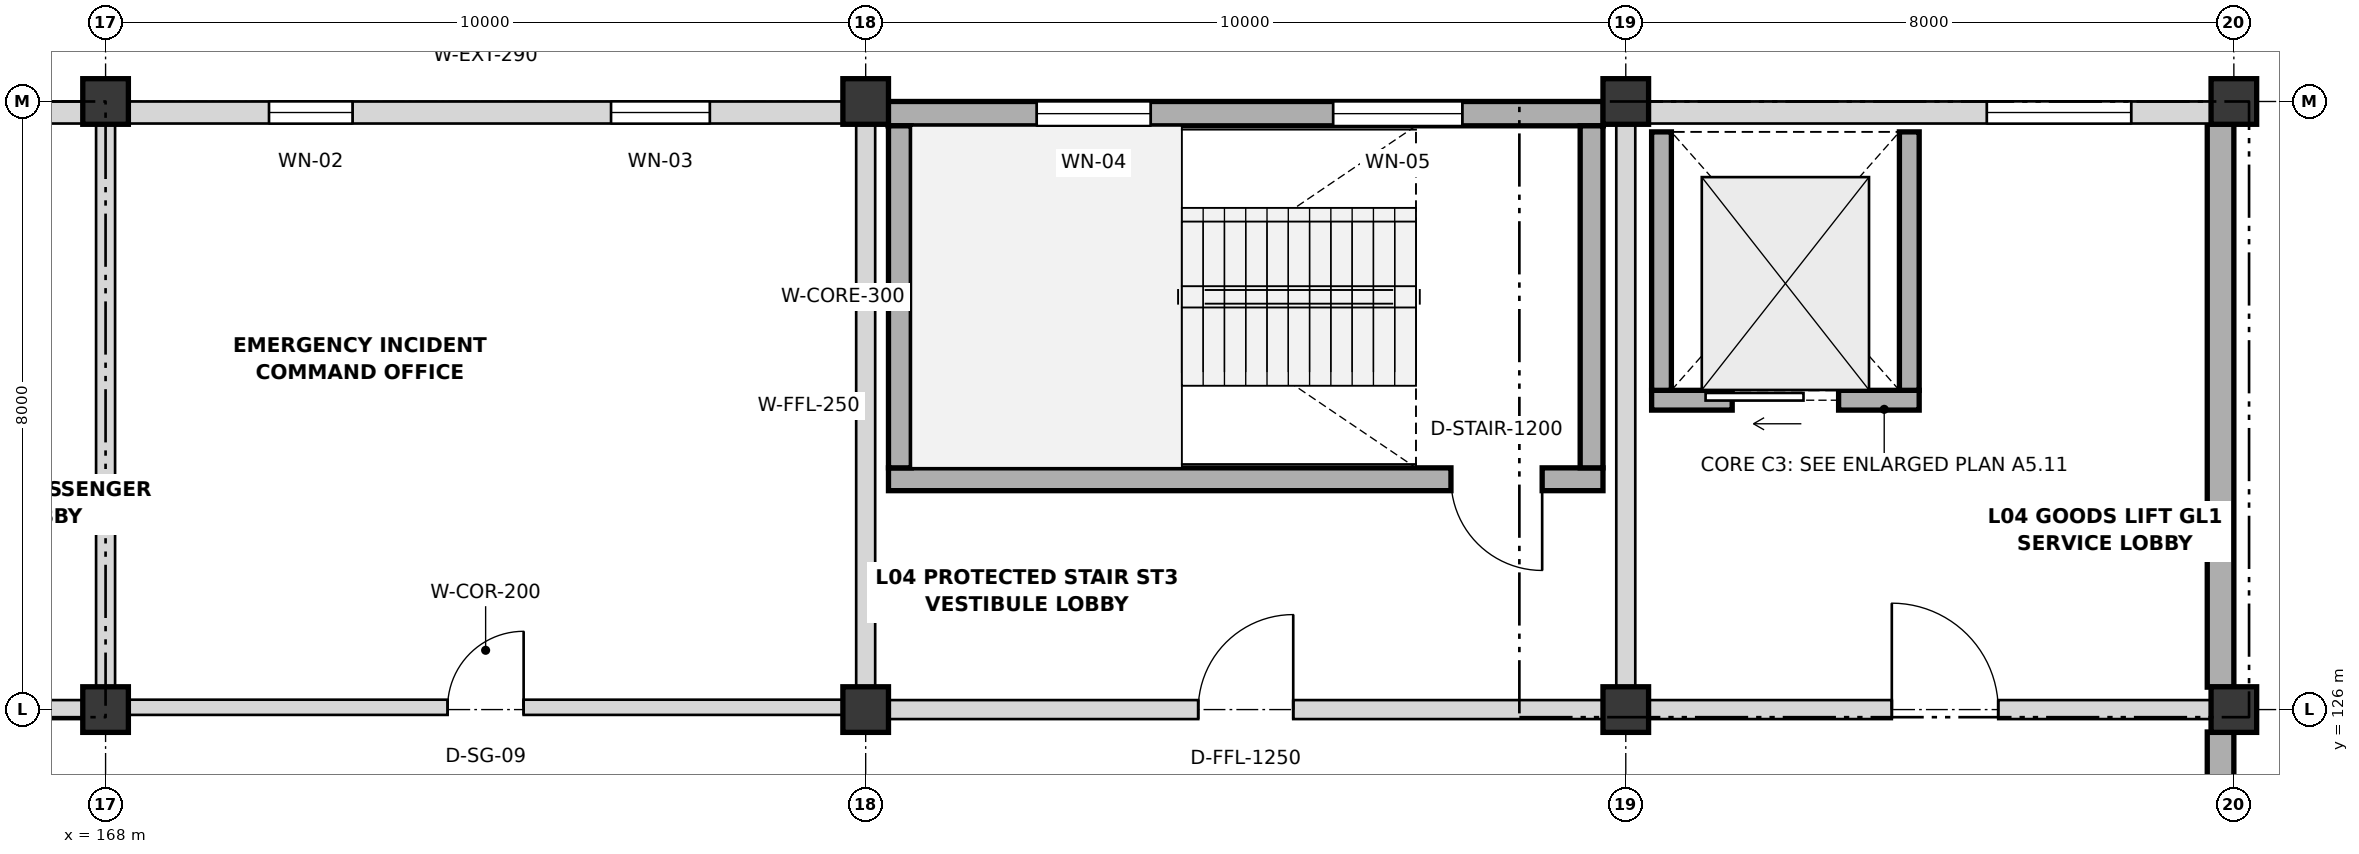
"""IFC4 building model, lengths in metres.
Left out: names, types, materials, properties, quantities, classifications, styles, units other than length and angle.
Written with IfcOpenShell. Run it as: python <this file> out.ifc"""

import sys

from ifc_helpers import new_model, si_unit, direction, frame, frame_2d, origin, origin_2d, place, context, subcontext, project, spatial, rectangle, extrude, element, fill, save


model = new_model("IFC4")
c1 = context("Model", 3, precision=1e-05, world=origin(), true_north=direction((0.0, 1.0)))
c2 = subcontext(c1, "Body", "Model", "MODEL_VIEW")
j1 = project(units=[si_unit("LENGTHUNIT", "METRE"), si_unit("PLANEANGLEUNIT", "RADIAN")], contexts=[c1])
p1 = place(None, origin())
s1 = spatial("IfcSite", under=j1, at=p1, CompositionType="ELEMENT")
p2 = place(p1, origin())
s2 = spatial("IfcBuilding", under=s1, at=p2, CompositionType="ELEMENT")
p3 = place(p2, frame((0.0, 0.0, 18.6)))
s3 = spatial("IfcBuildingStorey", under=s2, at=p3, CompositionType="ELEMENT", Elevation=18.6)
for number, where, z_axis, x_axis in (
    (1, (168.0, 126.0, 0.0), (0.0, 0.0, 1.0), (1.0, 0.0, 0.0)),
    (2, (168.0, 134.0, 0.0), (0.0, 0.0, 1.0), (1.0, 0.0, 0.0)),
    (3, (178.0, 126.0, 0.0), (0.0, 0.0, 1.0), (1.0, 0.0, 0.0)),
    (4, (178.0, 134.0, 0.0), (0.0, 0.0, 1.0), (1.0, 0.0, 0.0)),
    (5, (188.0, 126.0, 0.0), (0.0, 0.0, 1.0), (1.0, 0.0, 0.0)),
    (6, (188.0, 134.0, 0.0), (0.0, 0.0, 1.0), (1.0, 0.0, 0.0)),
    (7, (196.0, 126.0, 0.0), (0.0, 0.0, 1.0), (1.0, 0.0, 0.0)),
    (8, (196.0, 134.0, 0.0), (0.0, 0.0, 1.0), (1.0, 0.0, 0.0)),
):
    element("IfcColumn", number, at=place(p3, frame(where, z_axis=z_axis, x_axis=x_axis)), inside=s3, PredefinedType="COLUMN", context=c2, shape_type="SweptSolid", body=[
        extrude(rectangle(XDim=0.6, YDim=0.6, at=origin_2d()), origin(), (0.0, 0.0, 1.0), 4.2),
    ])
p4 = place(p3, frame((195.825, 125.705, 0.0), z_axis=(0.0, 0.0, 1.0), x_axis=(0.0, -1.0, 0.0)))
e9 = element("IfcWall", 9, at=p4, inside=s3, PredefinedType="SOLIDWALL", context=c2, shape_type="SweptSolid", body=[
    extrude(rectangle(XDim=11.41, YDim=0.35, at=frame_2d((5.705, 0.0))), origin(), (0.0, 0.0, 1.0), 4.2),
])
p5 = place(p3, frame((195.825, 133.705, 0.0), z_axis=(0.0, 0.0, 1.0), x_axis=(0.0, -1.0, 0.0)))
e10 = element("IfcWall", 10, at=p5, inside=s3, PredefinedType="SOLIDWALL", context=c2, shape_type="SweptSolid", body=[
    extrude(rectangle(XDim=7.41, YDim=0.35, at=frame_2d((3.705, 0.0))), origin(), (0.0, 0.0, 1.0), 4.2),
])
p6 = place(p3, frame((158.295, 133.855, 0.0), z_axis=(0.0, 0.0, 1.0), x_axis=(1.0, 0.0, 0.0)))
e11 = element("IfcWall", 11, at=p6, inside=s3, PredefinedType="SOLIDWALL", context=c2, shape_type="SweptSolid", body=[
    extrude(rectangle(XDim=9.41, YDim=0.29, at=frame_2d((4.705, 0.0))), origin(), (0.0, 0.0, 1.0), 3.188),
])
p7 = place(p6, frame((3.455, 0.0, 1.05)))
e12 = element("IfcOpeningElement", 12, at=p7, cuts=e11, PredefinedType="OPENING", context=c2, shape_type="SweptSolid", body=[
    extrude(rectangle(XDim=0.9, YDim=1.15, at=frame_2d((0.45, 0.575))), frame((0.0, 0.155, 0.0), z_axis=(0.0, -1.0, 0.0), x_axis=(1.0, 0.0, 0.0)), (0.0, 0.0, 1.0), 0.31),
])
p8 = place(p3, frame((168.295, 133.855, 0.0), z_axis=(0.0, 0.0, 1.0), x_axis=(1.0, 0.0, 0.0)))
e13 = element("IfcWall", 13, at=p8, inside=s3, PredefinedType="SOLIDWALL", context=c2, shape_type="SweptSolid", body=[
    extrude(rectangle(XDim=9.41, YDim=0.29, at=frame_2d((4.705, 0.0))), origin(), (0.0, 0.0, 1.0), 3.188),
])
p9 = place(p8, frame((1.855, 0.0, 1.05)))
e14 = element("IfcOpeningElement", 14, at=p9, cuts=e13, PredefinedType="OPENING", context=c2, shape_type="SweptSolid", body=[
    extrude(rectangle(XDim=1.1, YDim=1.15, at=frame_2d((0.55, 0.575))), frame((0.0, 0.155, 0.0), z_axis=(0.0, -1.0, 0.0), x_axis=(1.0, 0.0, 0.0)), (0.0, 0.0, 1.0), 0.31),
])
p10 = place(p8, frame((6.355, 0.0, 1.05)))
e15 = element("IfcOpeningElement", 15, at=p10, cuts=e13, PredefinedType="OPENING", context=c2, shape_type="SweptSolid", body=[
    extrude(rectangle(XDim=1.3, YDim=1.15, at=frame_2d((0.65, 0.575))), frame((0.0, 0.155, 0.0), z_axis=(0.0, -1.0, 0.0), x_axis=(1.0, 0.0, 0.0)), (0.0, 0.0, 1.0), 0.31),
])
p11 = place(p3, frame((178.295, 133.84, 0.0), z_axis=(0.0, 0.0, 1.0), x_axis=(1.0, 0.0, 0.0)))
e16 = element("IfcWall", 16, at=p11, inside=s3, PredefinedType="SHEAR", context=c2, shape_type="SweptSolid", body=[
    extrude(rectangle(XDim=9.41, YDim=0.32, at=frame_2d((4.705, 0.0))), origin(), (0.0, 0.0, 1.0), 4.2),
])
p12 = place(p11, frame((1.955, 0.0, 1.05)))
e17 = element("IfcOpeningElement", 17, at=p12, cuts=e16, PredefinedType="OPENING", context=c2, shape_type="SweptSolid", body=[
    extrude(rectangle(XDim=1.5, YDim=1.15, at=frame_2d((0.75, 0.575))), frame((0.0, 0.17, 0.0), z_axis=(0.0, -1.0, 0.0), x_axis=(1.0, 0.0, 0.0)), (0.0, 0.0, 1.0), 0.34),
])
p13 = place(p11, frame((5.855, 0.0, 1.05)))
e18 = element("IfcOpeningElement", 18, at=p13, cuts=e16, PredefinedType="OPENING", context=c2, shape_type="SweptSolid", body=[
    extrude(rectangle(XDim=1.7, YDim=1.15, at=frame_2d((0.85, 0.575))), frame((0.0, 0.17, 0.0), z_axis=(0.0, -1.0, 0.0), x_axis=(1.0, 0.0, 0.0)), (0.0, 0.0, 1.0), 0.34),
])
p14 = place(p3, frame((188.295, 133.855, 0.0), z_axis=(0.0, 0.0, 1.0), x_axis=(1.0, 0.0, 0.0)))
e19 = element("IfcWall", 19, at=p14, inside=s3, PredefinedType="SOLIDWALL", context=c2, shape_type="SweptSolid", body=[
    extrude(rectangle(XDim=7.41, YDim=0.29, at=frame_2d((3.705, 0.0))), origin(), (0.0, 0.0, 1.0), 3.188),
])
p15 = place(p14, frame((4.455, 0.0, 1.05)))
e20 = element("IfcOpeningElement", 20, at=p15, cuts=e19, PredefinedType="OPENING", context=c2, shape_type="SweptSolid", body=[
    extrude(rectangle(XDim=1.9, YDim=1.15, at=frame_2d((0.95, 0.575))), frame((0.0, 0.155, 0.0), z_axis=(0.0, -1.0, 0.0), x_axis=(1.0, 0.0, 0.0)), (0.0, 0.0, 1.0), 0.31),
])
p16 = place(p3, frame((187.7, 129.03, 0.0), z_axis=(0.0, 0.0, 1.0), x_axis=(-1.0, 0.0, 0.0)))
e21 = element("IfcWall", 21, at=p16, inside=s3, PredefinedType="SHEAR", context=c2, shape_type="SweptSolid", body=[
    extrude(rectangle(XDim=9.4, YDim=0.3, at=frame_2d((4.7, 0.0))), origin(), (0.0, 0.0, 1.0), 4.2),
])
p17 = place(p16, frame((0.8, 0.0, 0.0)))
e22 = element("IfcOpeningElement", 22, at=p17, cuts=e21, PredefinedType="OPENING", context=c2, shape_type="SweptSolid", body=[
    extrude(rectangle(XDim=1.2, YDim=2.15, at=frame_2d((0.6, 1.075))), frame((0.0, 0.16, 0.0), z_axis=(0.0, -1.0, 0.0), x_axis=(1.0, 0.0, 0.0)), (0.0, 0.0, 1.0), 0.32),
])
for number, where, z_axis, x_axis in (
    (23, (187.55, 133.68, 0.0), (0.0, 0.0, 1.0), (0.0, -1.0, 0.0)),
    (24, (178.45, 129.18, 0.0), (0.0, 0.0, 1.0), (0.0, 1.0, 0.0)),
):
    element("IfcWall", number, at=place(p3, frame(where, z_axis=z_axis, x_axis=x_axis)), inside=s3, PredefinedType="SHEAR", context=c2, shape_type="SweptSolid", body=[
        extrude(rectangle(XDim=4.5, YDim=0.3, at=frame_2d((2.25, 0.0))), origin(), (0.0, 0.0, 1.0), 4.2),
    ])
p18 = place(p3, frame((188.34, 130.07, 0.0), z_axis=(0.0, 0.0, 1.0), x_axis=(1.0, 0.0, 0.0)))
e25 = element("IfcWall", 25, at=p18, inside=s3, PredefinedType="SHEAR", context=c2, shape_type="SweptSolid", body=[
    extrude(rectangle(XDim=3.52, YDim=0.26, at=frame_2d((1.76, 0.0))), origin(), (0.0, 0.0, 1.0), 4.2),
])
p19 = place(p18, frame((1.06, 0.0, 0.0)))
e26 = element("IfcOpeningElement", 26, at=p19, cuts=e25, PredefinedType="OPENING", context=c2, shape_type="SweptSolid", body=[
    extrude(rectangle(XDim=1.4, YDim=2.2, at=frame_2d((0.7, 1.1))), frame((0.0, 0.14, 0.0), z_axis=(0.0, -1.0, 0.0), x_axis=(1.0, 0.0, 0.0)), (0.0, 0.0, 1.0), 0.28),
])
for number, where, z_axis, x_axis in (
    (27, (188.47, 130.2, 0.0), (0.0, 0.0, 1.0), (0.0, 1.0, 0.0)),
    (28, (191.73, 130.2, 0.0), (0.0, 0.0, 1.0), (0.0, 1.0, 0.0)),
):
    element("IfcWall", number, at=place(p3, frame(where, z_axis=z_axis, x_axis=x_axis)), inside=s3, PredefinedType="SHEAR", context=c2, shape_type="SweptSolid", body=[
        extrude(rectangle(XDim=3.4, YDim=0.26, at=frame_2d((1.7, 0.0))), origin(), (0.0, 0.0, 1.0), 4.2),
    ])
p20 = place(p3, frame((158.305, 126.0, 0.0), z_axis=(0.0, 0.0, 1.0), x_axis=(1.0, 0.0, 0.0)))
e29 = element("IfcWall", 29, at=p20, inside=s3, PredefinedType="PARTITIONING", context=c2, shape_type="SweptSolid", body=[
    extrude(rectangle(XDim=9.39, YDim=0.25, at=frame_2d((4.695, 0.0))), origin(), (0.0, 0.0, 1.0), 3.188),
])
p21 = place(p20, frame((1.87, 0.0, 0.0)))
e30 = element("IfcOpeningElement", 30, at=p21, cuts=e29, PredefinedType="OPENING", context=c2, shape_type="SweptSolid", body=[
    extrude(rectangle(XDim=1.25, YDim=2.15, at=frame_2d((0.625, 1.075))), frame((0.0, 0.135, 0.0), z_axis=(0.0, -1.0, 0.0), x_axis=(1.0, 0.0, 0.0)), (0.0, 0.0, 1.0), 0.27),
])
p22 = place(p20, frame((6.345, 0.0, 0.0)))
e31 = element("IfcOpeningElement", 31, at=p22, cuts=e29, PredefinedType="OPENING", context=c2, shape_type="SweptSolid", body=[
    extrude(rectangle(XDim=1.1, YDim=2.15, at=frame_2d((0.55, 1.075))), frame((0.0, 0.135, 0.0), z_axis=(0.0, -1.0, 0.0), x_axis=(1.0, 0.0, 0.0)), (0.0, 0.0, 1.0), 0.27),
])
p23 = place(p3, frame((178.305, 126.0, 0.0), z_axis=(0.0, 0.0, 1.0), x_axis=(1.0, 0.0, 0.0)))
e32 = element("IfcWall", 32, at=p23, inside=s3, PredefinedType="PARTITIONING", context=c2, shape_type="SweptSolid", body=[
    extrude(rectangle(XDim=9.39, YDim=0.25, at=frame_2d((4.695, 0.0))), origin(), (0.0, 0.0, 1.0), 3.188),
])
p24 = place(p23, frame((4.07, 0.0, 0.0)))
e33 = element("IfcOpeningElement", 33, at=p24, cuts=e32, PredefinedType="OPENING", context=c2, shape_type="SweptSolid", body=[
    extrude(rectangle(XDim=1.25, YDim=2.15, at=frame_2d((0.625, 1.075))), frame((0.0, 0.135, 0.0), z_axis=(0.0, -1.0, 0.0), x_axis=(1.0, 0.0, 0.0)), (0.0, 0.0, 1.0), 0.27),
])
p25 = place(p3, frame((188.305, 126.0, 0.0), z_axis=(0.0, 0.0, 1.0), x_axis=(1.0, 0.0, 0.0)))
e34 = element("IfcWall", 34, at=p25, inside=s3, PredefinedType="PARTITIONING", context=c2, shape_type="SweptSolid", body=[
    extrude(rectangle(XDim=7.39, YDim=0.25, at=frame_2d((3.695, 0.0))), origin(), (0.0, 0.0, 1.0), 3.188),
])
p26 = place(p25, frame((3.195, 0.0, 0.0)))
e35 = element("IfcOpeningElement", 35, at=p26, cuts=e34, PredefinedType="OPENING", context=c2, shape_type="SweptSolid", body=[
    extrude(rectangle(XDim=1.4, YDim=2.2, at=frame_2d((0.7, 1.1))), frame((0.0, 0.135, 0.0), z_axis=(0.0, -1.0, 0.0), x_axis=(1.0, 0.0, 0.0)), (0.0, 0.0, 1.0), 0.27),
])
for number, where, z_axis, x_axis in (
    (36, (168.0, 126.305, 0.0), (0.0, 0.0, 1.0), (0.0, 1.0, 0.0)),
    (37, (178.0, 126.305, 0.0), (0.0, 0.0, 1.0), (0.0, 1.0, 0.0)),
    (38, (188.0, 126.305, 0.0), (0.0, 0.0, 1.0), (0.0, 1.0, 0.0)),
):
    element("IfcWall", number, at=place(p3, frame(where, z_axis=z_axis, x_axis=x_axis)), inside=s3, PredefinedType="PARTITIONING", context=c2, shape_type="SweptSolid", body=[
        extrude(rectangle(XDim=7.39, YDim=0.25, at=frame_2d((3.695, 0.0))), origin(), (0.0, 0.0, 1.0), 3.188),
    ])
p27 = place(p3, frame((168.3, 126.03, 0.0), z_axis=(0.0, 0.0, 1.0), x_axis=(1.0, 0.0, 0.0)))
e39 = element("IfcWall", 39, at=p27, inside=s3, PredefinedType="PARTITIONING", context=c2, shape_type="SweptSolid", body=[
    extrude(rectangle(XDim=9.4, YDim=0.2, at=frame_2d((4.7, 0.0))), origin(), (0.0, 0.0, 1.0), 3.188),
])
p28 = place(p27, frame((4.2, 0.0, 0.0)))
e40 = element("IfcOpeningElement", 40, at=p28, cuts=e39, PredefinedType="OPENING", context=c2, shape_type="SweptSolid", body=[
    extrude(rectangle(XDim=1.0, YDim=2.2, at=frame_2d((0.5, 1.1))), frame((0.0, 0.11, 0.0), z_axis=(0.0, -1.0, 0.0), x_axis=(1.0, 0.0, 0.0)), (0.0, 0.0, 1.0), 0.22),
])
p29 = place(p9, origin())
e41 = element("IfcWindow", 41, at=p29, inside=s3, PartitioningType="SINGLE_PANEL", PredefinedType="WINDOW", context=c2, shape_type="SweptSolid", body=[
    extrude(rectangle(XDim=1.1, YDim=1.15, at=frame_2d((0.55, 0.575))), frame((0.0, 0.03, 0.0), z_axis=(0.0, -1.0, 0.0), x_axis=(1.0, 0.0, 0.0)), (0.0, 0.0, 1.0), 0.06),
])
fill(e14, e41)
p30 = place(p10, origin())
e42 = element("IfcWindow", 42, at=p30, inside=s3, PartitioningType="SINGLE_PANEL", PredefinedType="WINDOW", context=c2, shape_type="SweptSolid", body=[
    extrude(rectangle(XDim=1.3, YDim=1.15, at=frame_2d((0.65, 0.575))), frame((0.0, 0.03, 0.0), z_axis=(0.0, -1.0, 0.0), x_axis=(1.0, 0.0, 0.0)), (0.0, 0.0, 1.0), 0.06),
])
fill(e15, e42)
p31 = place(p12, origin())
e43 = element("IfcWindow", 43, at=p31, inside=s3, PartitioningType="SINGLE_PANEL", PredefinedType="WINDOW", context=c2, shape_type="SweptSolid", body=[
    extrude(rectangle(XDim=1.5, YDim=1.15, at=frame_2d((0.75, 0.575))), frame((0.0, 0.03, 0.0), z_axis=(0.0, -1.0, 0.0), x_axis=(1.0, 0.0, 0.0)), (0.0, 0.0, 1.0), 0.06),
])
fill(e17, e43)
p32 = place(p13, origin())
e44 = element("IfcWindow", 44, at=p32, inside=s3, PartitioningType="SINGLE_PANEL", PredefinedType="WINDOW", context=c2, shape_type="SweptSolid", body=[
    extrude(rectangle(XDim=1.7, YDim=1.15, at=frame_2d((0.85, 0.575))), frame((0.0, 0.03, 0.0), z_axis=(0.0, -1.0, 0.0), x_axis=(1.0, 0.0, 0.0)), (0.0, 0.0, 1.0), 0.06),
])
fill(e18, e44)
p33 = place(p15, origin())
e45 = element("IfcWindow", 45, at=p33, inside=s3, PartitioningType="SINGLE_PANEL", PredefinedType="WINDOW", context=c2, shape_type="SweptSolid", body=[
    extrude(rectangle(XDim=1.9, YDim=1.15, at=frame_2d((0.95, 0.575))), frame((0.0, 0.03, 0.0), z_axis=(0.0, -1.0, 0.0), x_axis=(1.0, 0.0, 0.0)), (0.0, 0.0, 1.0), 0.06),
])
fill(e20, e45)
p34 = place(p17, origin())
e46 = element("IfcDoor", 46, at=p34, inside=s3, OperationType="SINGLE_SWING_LEFT", PredefinedType="DOOR", context=c2, shape_type="SweptSolid", body=[
    extrude(rectangle(XDim=1.2, YDim=2.15, at=frame_2d((0.6, 1.075))), frame((0.0, 0.025, 0.0), z_axis=(0.0, -1.0, 0.0), x_axis=(1.0, 0.0, 0.0)), (0.0, 0.0, 1.0), 0.05),
])
fill(e22, e46)
p35 = place(p19, origin())
e47 = element("IfcDoor", 47, at=p35, inside=s3, OperationType="SLIDING_TO_LEFT", PredefinedType="DOOR", context=c2, shape_type="SweptSolid", body=[
    extrude(rectangle(XDim=1.4, YDim=2.2, at=frame_2d((0.7, 1.1))), frame((0.0, 0.025, 0.0), z_axis=(0.0, -1.0, 0.0), x_axis=(1.0, 0.0, 0.0)), (0.0, 0.0, 1.0), 0.05),
])
fill(e26, e47)
p36 = place(p24, origin())
e48 = element("IfcDoor", 48, at=p36, inside=s3, OperationType="SINGLE_SWING_RIGHT", PredefinedType="DOOR", context=c2, shape_type="SweptSolid", body=[
    extrude(rectangle(XDim=1.25, YDim=2.15, at=frame_2d((0.625, 1.075))), frame((0.0, 0.025, 0.0), z_axis=(0.0, -1.0, 0.0), x_axis=(1.0, 0.0, 0.0)), (0.0, 0.0, 1.0), 0.05),
])
fill(e33, e48)
p37 = place(p26, origin())
e49 = element("IfcDoor", 49, at=p37, inside=s3, OperationType="SINGLE_SWING_LEFT", PredefinedType="DOOR", context=c2, shape_type="SweptSolid", body=[
    extrude(rectangle(XDim=1.4, YDim=2.2, at=frame_2d((0.7, 1.1))), frame((0.0, 0.025, 0.0), z_axis=(0.0, -1.0, 0.0), x_axis=(1.0, 0.0, 0.0)), (0.0, 0.0, 1.0), 0.05),
])
fill(e35, e49)
p38 = place(p28, origin())
e50 = element("IfcDoor", 50, at=p38, inside=s3, OperationType="SINGLE_SWING_RIGHT", PredefinedType="DOOR", context=c2, shape_type="SweptSolid", body=[
    extrude(rectangle(XDim=1.0, YDim=2.2, at=frame_2d((0.5, 1.1))), frame((0.0, 0.025, 0.0), z_axis=(0.0, -1.0, 0.0), x_axis=(1.0, 0.0, 0.0)), (0.0, 0.0, 1.0), 0.05),
])
fill(e40, e50)
save(model, sys.argv[1])
